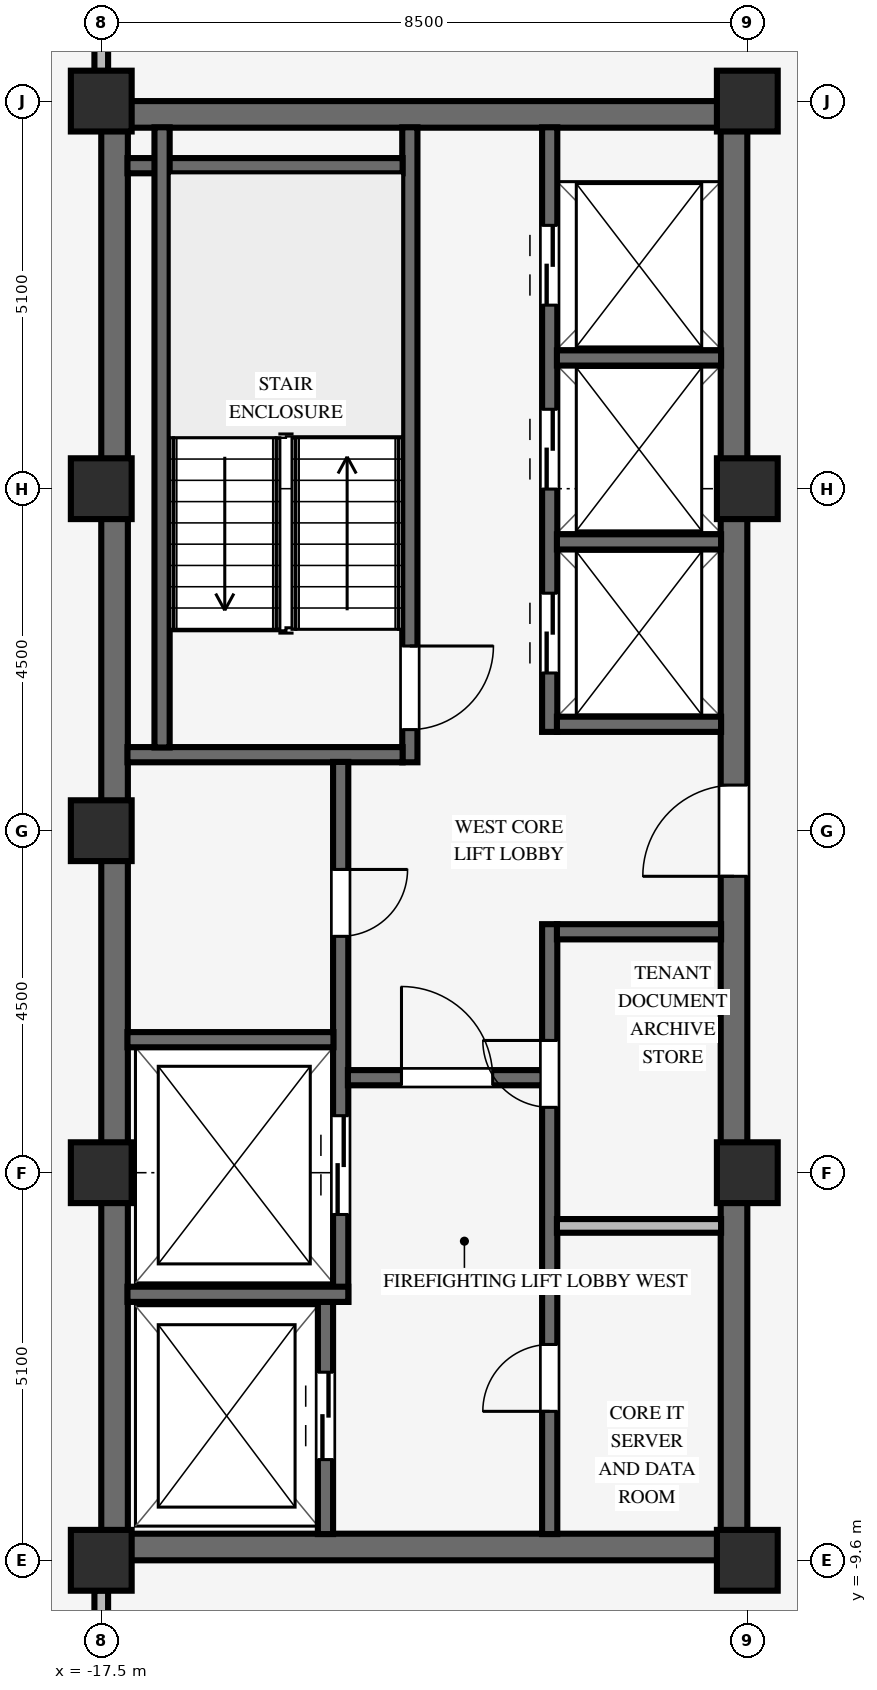
"""IFC4 building model, lengths in metres.
Left out: names, types, materials, properties, quantities, classifications, styles, units other than length and angle.
Written with IfcOpenShell. Run it as: python <this file> out.ifc"""

import sys

from ifc_helpers import new_model, si_unit, direction, frame, frame_2d, origin, origin_2d, place, context, subcontext, project, spatial, rectangle, extrude, source, transform, mapped, element, fill, save


model = new_model("IFC4")
c1 = context("Model", 3, precision=1e-05, world=origin(), true_north=direction((0.0, 1.0)))
c2 = subcontext(c1, "Body", "Model", "MODEL_VIEW")
j1 = project(units=[si_unit("LENGTHUNIT", "METRE"), si_unit("PLANEANGLEUNIT", "RADIAN")], contexts=[c1])
p1 = place(None, origin())
s1 = spatial("IfcSite", under=j1, at=p1, CompositionType="ELEMENT")
p2 = place(p1, origin())
s2 = spatial("IfcBuilding", under=s1, at=p2, CompositionType="ELEMENT")
p3 = place(p2, frame((0.0, 0.0, 227.4)))
s3 = spatial("IfcBuildingStorey", under=s2, at=p3, CompositionType="ELEMENT", Elevation=227.4)
for number, where, z_axis, x_axis in (
    (1, (-17.5, -9.425, 0.0), (0.0, 0.0, 1.0), (1.0, 0.0, 0.0)),
    (2, (-17.5, 9.425, 0.0), (0.0, 0.0, 1.0), (1.0, 0.0, 0.0)),
):
    element("IfcWall", number, at=place(p3, frame(where, z_axis=z_axis, x_axis=x_axis)), inside=s3, PredefinedType="SHEAR", context=c2, shape_type="SweptSolid", body=[
        extrude(rectangle(XDim=8.5, YDim=0.35, at=frame_2d((4.25, 0.0))), origin(), (0.0, 0.0, 1.0), 3.37),
    ])
p4 = place(p3, frame((-17.325, -9.255, 0.0), z_axis=(0.0, 0.0, 1.0), x_axis=(0.0, 1.0, 0.0)))
e3 = element("IfcWall", 3, at=p4, inside=s3, PredefinedType="SHEAR", context=c2, shape_type="SweptSolid", body=[
    extrude(rectangle(XDim=18.51, YDim=0.35, at=frame_2d((9.255, 0.0))), origin(), (0.0, 0.0, 1.0), 3.37),
])
p5 = place(p3, frame((-9.175, -9.255, 0.0), z_axis=(0.0, 0.0, 1.0), x_axis=(0.0, 1.0, 0.0)))
e4 = element("IfcWall", 4, at=p5, inside=s3, PredefinedType="SHEAR", context=c2, shape_type="SweptSolid", body=[
    extrude(rectangle(XDim=18.51, YDim=0.35, at=frame_2d((9.255, 0.0))), origin(), (0.0, 0.0, 1.0), 3.37),
])
p6 = place(p5, frame((8.655, 0.0, 0.0)))
e5 = element("IfcOpeningElement", 5, at=p6, cuts=e4, PredefinedType="OPENING", context=c2, shape_type="SweptSolid", body=[
    extrude(rectangle(XDim=1.2, YDim=2.15, at=frame_2d((0.6, 1.075))), frame((0.0, 0.185, 0.0), z_axis=(0.0, -1.0, 0.0), x_axis=(1.0, 0.0, 0.0)), (0.0, 0.0, 1.0), 0.37),
])
for number, where, z_axis, x_axis in (
    (6, (-17.5, -9.6, 0.0), (0.0, 0.0, 1.0), (1.0, 0.0, 0.0)),
    (7, (-17.5, -4.5, 0.0), (0.0, 0.0, 1.0), (1.0, 0.0, 0.0)),
    (8, (-17.5, 4.5, 0.0), (0.0, 0.0, 1.0), (1.0, 0.0, 0.0)),
    (9, (-17.5, 9.6, 0.0), (0.0, 0.0, 1.0), (1.0, 0.0, 0.0)),
    (10, (-9.0, -9.6, 0.0), (0.0, 0.0, 1.0), (1.0, 0.0, 0.0)),
    (11, (-9.0, -4.5, 0.0), (0.0, 0.0, 1.0), (1.0, 0.0, 0.0)),
    (12, (-9.0, 4.5, 0.0), (0.0, 0.0, 1.0), (1.0, 0.0, 0.0)),
    (13, (-9.0, 9.6, 0.0), (0.0, 0.0, 1.0), (1.0, 0.0, 0.0)),
    (14, (-17.5, 0.0, 0.0), (0.0, 0.0, 1.0), (1.0, 0.0, 0.0)),
):
    element("IfcColumn", number, at=place(p3, frame(where, z_axis=z_axis, x_axis=x_axis)), inside=s3, PredefinedType="COLUMN", context=c2, shape_type="SweptSolid", body=[
        extrude(rectangle(XDim=0.8, YDim=0.8, at=origin_2d()), origin(), (0.0, 0.0, 1.0), 3.37),
    ])
p7 = place(p3, frame((-13.44, 0.9, 0.0), z_axis=(0.0, 0.0, 1.0), x_axis=(0.0, 1.0, 0.0)))
e15 = element("IfcWall", 15, at=p7, inside=s3, PredefinedType="SHEAR", context=c2, shape_type="SweptSolid", body=[
    extrude(rectangle(XDim=8.355, YDim=0.2, at=frame_2d((4.177, 0.0))), origin(), (0.0, 0.0, 1.0), 3.37),
])
p8 = place(p7, frame((1.53, 0.0, 0.0), z_axis=(0.0, 0.0, 1.0), x_axis=(-1.0, 0.0, 0.0)))
e16 = element("IfcOpeningElement", 16, at=p8, cuts=e15, PredefinedType="OPENING", context=c2, shape_type="SweptSolid", body=[
    extrude(rectangle(XDim=1.1, YDim=2.15, at=frame_2d((0.55, 1.075))), frame((0.0, 0.11, 0.0), z_axis=(0.0, -1.0, 0.0), x_axis=(1.0, 0.0, 0.0)), (0.0, 0.0, 1.0), 0.22),
])
for number, where, z_axis, x_axis in (
    (17, (-17.155, 1.0, 0.0), (0.0, 0.0, 1.0), (1.0, 0.0, 0.0)),
    (18, (-17.155, 8.75, 0.0), (0.0, 0.0, 1.0), (1.0, 0.0, 0.0)),
):
    element("IfcWall", number, at=place(p3, frame(where, z_axis=z_axis, x_axis=x_axis)), inside=s3, PredefinedType="SHEAR", context=c2, shape_type="SweptSolid", body=[
        extrude(rectangle(XDim=3.62, YDim=0.2, at=frame_2d((1.81, 0.0))), origin(), (0.0, 0.0, 1.0), 3.37),
    ])
p9 = place(p3, frame((-16.7, 1.095, 0.0), z_axis=(0.0, 0.0, 1.0), x_axis=(0.0, 1.0, 0.0)))
e19 = element("IfcWall", 19, at=p9, inside=s3, PredefinedType="SHEAR", context=c2, shape_type="SweptSolid", body=[
    extrude(rectangle(XDim=8.16, YDim=0.2, at=frame_2d((4.08, 0.0))), origin(), (0.0, 0.0, 1.0), 3.37),
])
p10 = place(p3, frame((-14.55, -9.255, 0.0), z_axis=(0.0, 0.0, 1.0), x_axis=(0.0, 1.0, 0.0)))
e20 = element("IfcWall", 20, at=p10, inside=s3, PredefinedType="SHEAR", context=c2, shape_type="SweptSolid", body=[
    extrude(rectangle(XDim=3.06, YDim=0.2, at=frame_2d((1.53, 0.0))), origin(), (0.0, 0.0, 1.0), 3.37),
])
p11 = place(p10, frame((0.98, 0.0, 0.0)))
e21 = element("IfcOpeningElement", 21, at=p11, cuts=e20, PredefinedType="OPENING", context=c2, shape_type="SweptSolid", body=[
    extrude(rectangle(XDim=1.15, YDim=2.15, at=frame_2d((0.575, 1.075))), frame((0.0, 0.11, 0.0), z_axis=(0.0, -1.0, 0.0), x_axis=(1.0, 0.0, 0.0)), (0.0, 0.0, 1.0), 0.22),
])
p12 = place(p3, frame((-14.35, -6.2, 0.0), z_axis=(0.0, 0.0, 1.0), x_axis=(0.0, 1.0, 0.0)))
e22 = element("IfcWall", 22, at=p12, inside=s3, PredefinedType="SHEAR", context=c2, shape_type="SweptSolid", body=[
    extrude(rectangle(XDim=7.105, YDim=0.2, at=frame_2d((3.552, 0.0))), origin(), (0.0, 0.0, 1.0), 3.37),
])
p13 = place(p12, frame((5.69, 0.0, 0.0), z_axis=(0.0, 0.0, 1.0), x_axis=(-1.0, 0.0, 0.0)))
e23 = element("IfcOpeningElement", 23, at=p13, cuts=e22, PredefinedType="OPENING", context=c2, shape_type="SweptSolid", body=[
    extrude(rectangle(XDim=0.88, YDim=2.1, at=frame_2d((0.44, 1.05))), frame((0.0, 0.11, 0.0), z_axis=(0.0, -1.0, 0.0), x_axis=(1.0, 0.0, 0.0)), (0.0, 0.0, 1.0), 0.22),
])
p14 = place(p12, frame((1.15, 0.0, 0.0)))
e24 = element("IfcOpeningElement", 24, at=p14, cuts=e22, PredefinedType="OPENING", context=c2, shape_type="SweptSolid", body=[
    extrude(rectangle(XDim=1.3, YDim=2.2, at=frame_2d((0.65, 1.1))), frame((0.0, 0.11, 0.0), z_axis=(0.0, -1.0, 0.0), x_axis=(1.0, 0.0, 0.0)), (0.0, 0.0, 1.0), 0.22),
])
p15 = place(p3, frame((-17.155, -6.1, 0.0), z_axis=(0.0, 0.0, 1.0), x_axis=(1.0, 0.0, 0.0)))
e25 = element("IfcWall", 25, at=p15, inside=s3, PredefinedType="SHEAR", context=c2, shape_type="SweptSolid", body=[
    extrude(rectangle(XDim=2.905, YDim=0.2, at=frame_2d((1.453, 0.0))), origin(), (0.0, 0.0, 1.0), 3.37),
])
p16 = place(p3, frame((-17.155, -2.75, 0.0), z_axis=(0.0, 0.0, 1.0), x_axis=(1.0, 0.0, 0.0)))
e26 = element("IfcWall", 26, at=p16, inside=s3, PredefinedType="SHEAR", context=c2, shape_type="SweptSolid", body=[
    extrude(rectangle(XDim=2.71, YDim=0.2, at=frame_2d((1.355, 0.0))), origin(), (0.0, 0.0, 1.0), 3.37),
])
p17 = place(p3, frame((-11.6, -9.255, 0.0), z_axis=(0.0, 0.0, 1.0), x_axis=(0.0, 1.0, 0.0)))
e27 = element("IfcWall", 27, at=p17, inside=s3, PredefinedType="SHEAR", context=c2, shape_type="SweptSolid", body=[
    extrude(rectangle(XDim=8.025, YDim=0.2, at=frame_2d((4.012, 0.0))), origin(), (0.0, 0.0, 1.0), 3.37),
])
p18 = place(p17, frame((1.615, 0.0, 0.0)))
e28 = element("IfcOpeningElement", 28, at=p18, cuts=e27, PredefinedType="OPENING", context=c2, shape_type="SweptSolid", body=[
    extrude(rectangle(XDim=0.88, YDim=2.1, at=frame_2d((0.44, 1.05))), frame((0.0, 0.11, 0.0), z_axis=(0.0, -1.0, 0.0), x_axis=(1.0, 0.0, 0.0)), (0.0, 0.0, 1.0), 0.22),
])
p19 = place(p17, frame((5.615, 0.0, 0.0)))
e29 = element("IfcOpeningElement", 29, at=p19, cuts=e27, PredefinedType="OPENING", context=c2, shape_type="SweptSolid", body=[
    extrude(rectangle(XDim=0.88, YDim=2.1, at=frame_2d((0.44, 1.05))), frame((0.0, 0.11, 0.0), z_axis=(0.0, -1.0, 0.0), x_axis=(1.0, 0.0, 0.0)), (0.0, 0.0, 1.0), 0.22),
])
p20 = place(p3, frame((-14.255, -3.25, 0.0), z_axis=(0.0, 0.0, 1.0), x_axis=(1.0, 0.0, 0.0)))
e30 = element("IfcWall", 30, at=p20, inside=s3, PredefinedType="SHEAR", context=c2, shape_type="SweptSolid", body=[
    extrude(rectangle(XDim=2.56, YDim=0.2, at=frame_2d((1.28, 0.0))), origin(), (0.0, 0.0, 1.0), 3.37),
])
p21 = place(p20, frame((0.705, 0.0, 0.0)))
e31 = element("IfcOpeningElement", 31, at=p21, cuts=e30, PredefinedType="OPENING", context=c2, shape_type="SweptSolid", body=[
    extrude(rectangle(XDim=1.2, YDim=2.15, at=frame_2d((0.6, 1.075))), frame((0.0, 0.11, 0.0), z_axis=(0.0, -1.0, 0.0), x_axis=(1.0, 0.0, 0.0)), (0.0, 0.0, 1.0), 0.22),
])
p22 = place(p3, frame((-11.505, -1.33, 0.0), z_axis=(0.0, 0.0, 1.0), x_axis=(1.0, 0.0, 0.0)))
e32 = element("IfcWall", 32, at=p22, inside=s3, PredefinedType="SHEAR", context=c2, shape_type="SweptSolid", body=[
    extrude(rectangle(XDim=2.16, YDim=0.2, at=frame_2d((1.08, 0.0))), origin(), (0.0, 0.0, 1.0), 3.37),
])
p23 = place(p3, frame((-11.505, -5.2, 0.0), z_axis=(0.0, 0.0, 1.0), x_axis=(1.0, 0.0, 0.0)))
e33 = element("IfcWall", 33, at=p23, inside=s3, PredefinedType="PARTITIONING", context=c2, shape_type="SweptSolid", body=[
    extrude(rectangle(XDim=2.16, YDim=0.18, at=frame_2d((1.08, 0.0))), origin(), (0.0, 0.0, 1.0), 3.36),
])
p24 = place(p3, frame((-11.6, 1.3, 0.0), z_axis=(0.0, 0.0, 1.0), x_axis=(0.0, 1.0, 0.0)))
e34 = element("IfcWall", 34, at=p24, inside=s3, PredefinedType="SHEAR", context=c2, shape_type="SweptSolid", body=[
    extrude(rectangle(XDim=7.955, YDim=0.2, at=frame_2d((3.978, 0.0))), origin(), (0.0, 0.0, 1.0), 3.37),
])
p25 = place(p24, frame((0.775, 0.0, 0.0)))
e35 = element("IfcOpeningElement", 35, at=p25, cuts=e34, PredefinedType="OPENING", context=c2, shape_type="SweptSolid", body=[
    extrude(rectangle(XDim=1.05, YDim=2.15, at=frame_2d((0.525, 1.075))), frame((0.0, 0.11, 0.0), z_axis=(0.0, -1.0, 0.0), x_axis=(1.0, 0.0, 0.0)), (0.0, 0.0, 1.0), 0.22),
])
p26 = place(p24, frame((3.195, 0.0, 0.0)))
e36 = element("IfcOpeningElement", 36, at=p26, cuts=e34, PredefinedType="OPENING", context=c2, shape_type="SweptSolid", body=[
    extrude(rectangle(XDim=1.05, YDim=2.15, at=frame_2d((0.525, 1.075))), frame((0.0, 0.11, 0.0), z_axis=(0.0, -1.0, 0.0), x_axis=(1.0, 0.0, 0.0)), (0.0, 0.0, 1.0), 0.22),
])
p27 = place(p24, frame((5.615, 0.0, 0.0)))
e37 = element("IfcOpeningElement", 37, at=p27, cuts=e34, PredefinedType="OPENING", context=c2, shape_type="SweptSolid", body=[
    extrude(rectangle(XDim=1.05, YDim=2.15, at=frame_2d((0.525, 1.075))), frame((0.0, 0.11, 0.0), z_axis=(0.0, -1.0, 0.0), x_axis=(1.0, 0.0, 0.0)), (0.0, 0.0, 1.0), 0.22),
])
for number, where, z_axis, x_axis in (
    (38, (-11.505, 1.4, 0.0), (0.0, 0.0, 1.0), (1.0, 0.0, 0.0)),
    (39, (-11.505, 3.8, 0.0), (0.0, 0.0, 1.0), (1.0, 0.0, 0.0)),
    (40, (-11.505, 6.22, 0.0), (0.0, 0.0, 1.0), (1.0, 0.0, 0.0)),
):
    element("IfcWall", number, at=place(p3, frame(where, z_axis=z_axis, x_axis=x_axis)), inside=s3, PredefinedType="SHEAR", context=c2, shape_type="SweptSolid", body=[
        extrude(rectangle(XDim=2.16, YDim=0.2, at=frame_2d((1.08, 0.0))), origin(), (0.0, 0.0, 1.0), 3.37),
    ])
for number, where, z_axis, x_axis in (
    (41, (-17.5, -11.114, 0.0), (0.0, 0.0, 1.0), (0.0, 1.0, 0.0)),
    (42, (-17.5, 9.996, 0.0), (0.0, 0.0, 1.0), (0.0, 1.0, 0.0)),
):
    element("IfcWall", number, at=place(p3, frame(where, z_axis=z_axis, x_axis=x_axis)), inside=s3, PredefinedType="PARTITIONING", context=c2, shape_type="SweptSolid", body=[
        extrude(rectangle(XDim=1.118, YDim=0.18, at=frame_2d((0.559, 0.0))), origin(), (0.0, 0.0, 1.0), 2.892),
    ])
m1 = source(origin(), c2, "Body", "SweptSolid", [
    extrude(rectangle(XDim=1.1, YDim=2.15, at=frame_2d((0.55, 1.075))), frame((0.0, 0.025, 0.0), z_axis=(0.0, -1.0, 0.0), x_axis=(1.0, 0.0, 0.0)), (0.0, 0.0, 1.0), 0.05),
])
p28 = place(p8, origin())
e43 = element("IfcDoor", 43, at=p28, inside=s3, OperationType="SINGLE_SWING_LEFT", PredefinedType="DOOR", context=c2, shape_type="MappedRepresentation", body=[
    mapped(m1, transform((0.0, 0.0, 0.0), scale=1.0)),
])
fill(e16, e43)
m2 = source(origin(), c2, "Body", "SweptSolid", [
    extrude(rectangle(XDim=0.88, YDim=2.1, at=frame_2d((0.44, 1.05))), frame((0.0, 0.025, 0.0), z_axis=(0.0, -1.0, 0.0), x_axis=(1.0, 0.0, 0.0)), (0.0, 0.0, 1.0), 0.05),
])
p29 = place(p13, origin())
e44 = element("IfcDoor", 44, at=p29, inside=s3, OperationType="SINGLE_SWING_LEFT", PredefinedType="DOOR", context=c2, shape_type="MappedRepresentation", body=[
    mapped(m2, transform((0.0, 0.0, 0.0), scale=1.0)),
])
fill(e23, e44)
m3 = source(origin(), c2, "Body", "SweptSolid", [
    extrude(rectangle(XDim=1.2, YDim=2.15, at=frame_2d((0.6, 1.075))), frame((0.0, 0.025, 0.0), z_axis=(0.0, -1.0, 0.0), x_axis=(1.0, 0.0, 0.0)), (0.0, 0.0, 1.0), 0.05),
])
p30 = place(p21, origin())
e45 = element("IfcDoor", 45, at=p30, inside=s3, OperationType="SINGLE_SWING_LEFT", PredefinedType="DOOR", context=c2, shape_type="MappedRepresentation", body=[
    mapped(m3, transform((0.0, 0.0, 0.0), scale=1.0)),
])
fill(e31, e45)
p31 = place(p18, origin())
e46 = element("IfcDoor", 46, at=p31, inside=s3, OperationType="SINGLE_SWING_LEFT", PredefinedType="DOOR", context=c2, shape_type="MappedRepresentation", body=[
    mapped(m2, transform((0.0, 0.0, 0.0), scale=1.0)),
])
fill(e28, e46)
p32 = place(p19, origin())
e47 = element("IfcDoor", 47, at=p32, inside=s3, OperationType="SINGLE_SWING_RIGHT", PredefinedType="DOOR", context=c2, shape_type="MappedRepresentation", body=[
    mapped(m2, transform((0.0, 0.0, 0.0), scale=1.0)),
])
fill(e29, e47)
p33 = place(p6, origin())
e48 = element("IfcDoor", 48, at=p33, inside=s3, OperationType="SINGLE_SWING_LEFT", PredefinedType="DOOR", context=c2, shape_type="MappedRepresentation", body=[
    mapped(m3, transform((0.0, 0.0, 0.0), scale=1.0)),
])
fill(e5, e48)
m4 = source(origin(), c2, "Body", "SweptSolid", [
    extrude(rectangle(XDim=1.15, YDim=2.15, at=frame_2d((0.575, 1.075))), frame((0.0, 0.025, 0.0), z_axis=(0.0, -1.0, 0.0), x_axis=(1.0, 0.0, 0.0)), (0.0, 0.0, 1.0), 0.05),
])
p34 = place(p11, origin())
e49 = element("IfcDoor", 49, at=p34, inside=s3, OperationType="DOUBLE_DOOR_SLIDING", PredefinedType="DOOR", context=c2, shape_type="MappedRepresentation", body=[
    mapped(m4, transform((0.0, 0.0, 0.0), scale=1.0)),
])
fill(e21, e49)
m5 = source(origin(), c2, "Body", "SweptSolid", [
    extrude(rectangle(XDim=1.3, YDim=2.2, at=frame_2d((0.65, 1.1))), frame((0.0, 0.025, 0.0), z_axis=(0.0, -1.0, 0.0), x_axis=(1.0, 0.0, 0.0)), (0.0, 0.0, 1.0), 0.05),
])
p35 = place(p14, origin())
e50 = element("IfcDoor", 50, at=p35, inside=s3, OperationType="DOUBLE_DOOR_SLIDING", PredefinedType="DOOR", context=c2, shape_type="MappedRepresentation", body=[
    mapped(m5, transform((0.0, 0.0, 0.0), scale=1.0)),
])
fill(e24, e50)
m6 = source(origin(), c2, "Body", "SweptSolid", [
    extrude(rectangle(XDim=1.05, YDim=2.15, at=frame_2d((0.525, 1.075))), frame((0.0, 0.025, 0.0), z_axis=(0.0, -1.0, 0.0), x_axis=(1.0, 0.0, 0.0)), (0.0, 0.0, 1.0), 0.05),
])
p36 = place(p25, origin())
e51 = element("IfcDoor", 51, at=p36, inside=s3, OperationType="DOUBLE_DOOR_SLIDING", PredefinedType="DOOR", context=c2, shape_type="MappedRepresentation", body=[
    mapped(m6, transform((0.0, 0.0, 0.0), scale=1.0)),
])
fill(e35, e51)
p37 = place(p26, origin())
e52 = element("IfcDoor", 52, at=p37, inside=s3, OperationType="DOUBLE_DOOR_SLIDING", PredefinedType="DOOR", context=c2, shape_type="MappedRepresentation", body=[
    mapped(m6, transform((0.0, 0.0, 0.0), scale=1.0)),
])
fill(e36, e52)
p38 = place(p27, origin())
e53 = element("IfcDoor", 53, at=p38, inside=s3, OperationType="DOUBLE_DOOR_SLIDING", PredefinedType="DOOR", context=c2, shape_type="MappedRepresentation", body=[
    mapped(m6, transform((0.0, 0.0, 0.0), scale=1.0)),
])
fill(e37, e53)
save(model, sys.argv[1])
